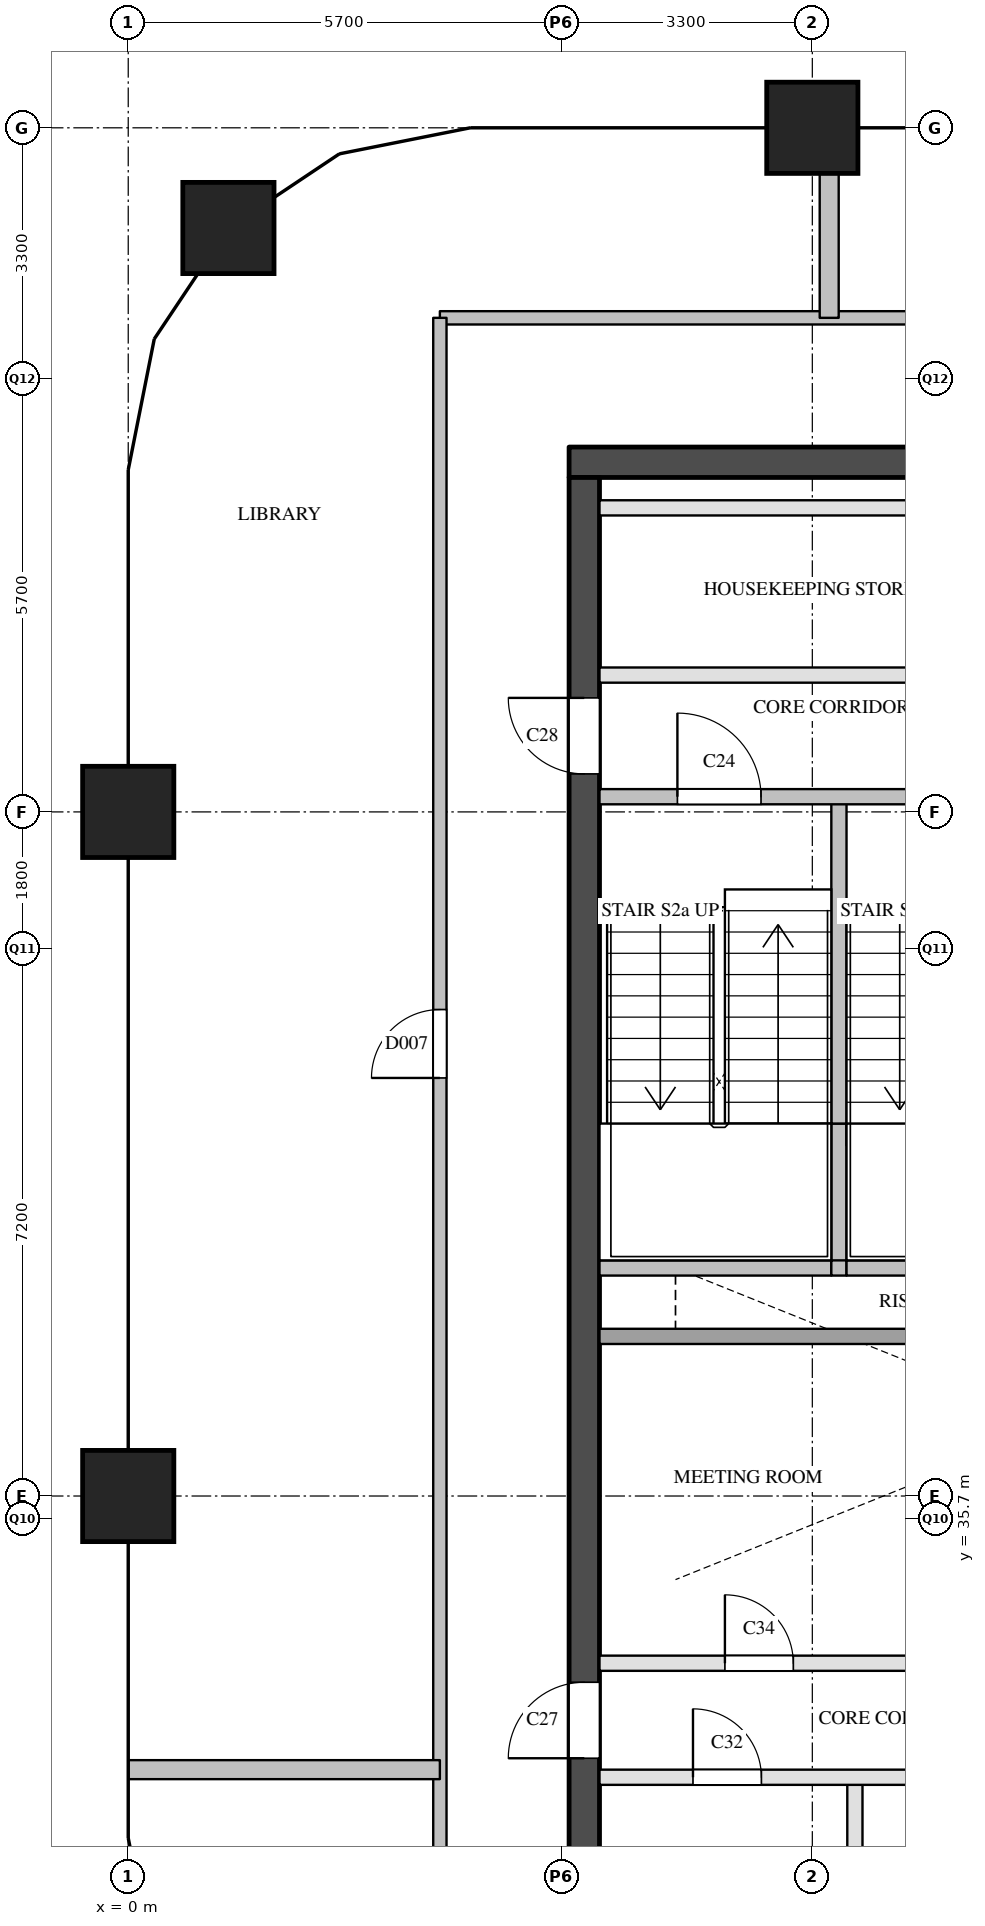
"""IFC4 building model, lengths in metres.
Left out: names, types, materials, properties, quantities, classifications, styles, units other than length and angle.
Written with IfcOpenShell. Run it as: python <this file> out.ifc"""

import sys

from ifc_helpers import new_model, si_unit, direction, frame, frame_2d, origin, origin_2d, place, context, subcontext, project, spatial, rectangle, extrude, element, fill, save


model = new_model("IFC4")
c1 = context("Model", 3, precision=1e-05, world=origin(), true_north=direction((0.0, 1.0)))
c2 = subcontext(c1, "Body", "Model", "MODEL_VIEW")
j1 = project(units=[si_unit("LENGTHUNIT", "METRE"), si_unit("PLANEANGLEUNIT", "RADIAN")], contexts=[c1])
p1 = place(None, origin())
s1 = spatial("IfcSite", under=j1, at=p1, CompositionType="ELEMENT")
p2 = place(p1, origin())
s2 = spatial("IfcBuilding", under=s1, at=p2, CompositionType="ELEMENT")
p3 = place(p2, frame((0.0, 0.0, 203.3)))
s3 = spatial("IfcBuildingStorey", under=s2, at=p3, CompositionType="ELEMENT", Elevation=203.3)
for number, where, z_axis, x_axis in (
    (1, (0.0, 36.0, 0.0), (0.0, 0.0, 1.0), (1.0, 0.0, 0.0)),
    (2, (0.0, 45.0, 0.0), (0.0, 0.0, 1.0), (1.0, 0.0, 0.0)),
    (3, (1.318, 52.682, 0.0), (0.0, 0.0, 1.0), (1.0, 0.0, 0.0)),
    (4, (9.0, 54.0, 0.0), (0.0, 0.0, 1.0), (1.0, 0.0, 0.0)),
):
    element("IfcColumn", number, at=place(p3, frame(where, z_axis=z_axis, x_axis=x_axis)), inside=s3, PredefinedType="COLUMN", context=c2, shape_type="SweptSolid", body=[
        extrude(rectangle(XDim=1.2, YDim=1.2, at=origin_2d()), origin(), (0.0, 0.0, 1.0), 3.9),
    ])
p4 = place(p3, frame((5.8, 49.6, 0.0), z_axis=(0.0, 0.0, 1.0), x_axis=(1.0, 0.0, 0.0)))
e5 = element("IfcWall", 5, at=p4, inside=s3, PredefinedType="SHEAR", context=c2, shape_type="SweptSolid", body=[
    extrude(rectangle(XDim=12.0, YDim=0.4, at=frame_2d((6.0, 0.0))), origin(), (0.0, 0.0, 1.0), 3.6),
])
p5 = place(p3, frame((6.0, 29.1, 0.0), z_axis=(0.0, 0.0, 1.0), x_axis=(0.0, 1.0, 0.0)))
e6 = element("IfcWall", 6, at=p5, inside=s3, PredefinedType="SHEAR", context=c2, shape_type="SweptSolid", body=[
    extrude(rectangle(XDim=20.3, YDim=0.4, at=frame_2d((10.15, 0.0))), origin(), (0.0, 0.0, 1.0), 3.6),
])
p6 = place(p5, frame((3.45, 0.0, 0.0)))
e7 = element("IfcOpeningElement", 7, at=p6, cuts=e6, PredefinedType="OPENING", context=c2, shape_type="SweptSolid", body=[
    extrude(rectangle(XDim=1.0, YDim=2.1, at=frame_2d((0.5, 1.05))), frame((0.0, 0.21, 0.0), z_axis=(0.0, -1.0, 0.0), x_axis=(1.0, 0.0, 0.0)), (0.0, 0.0, 1.0), 0.42),
])
p7 = place(p5, frame((16.4, 0.0, 0.0)))
e8 = element("IfcOpeningElement", 8, at=p7, cuts=e6, PredefinedType="OPENING", context=c2, shape_type="SweptSolid", body=[
    extrude(rectangle(XDim=1.0, YDim=2.1, at=frame_2d((0.5, 1.05))), frame((0.0, 0.21, 0.0), z_axis=(0.0, -1.0, 0.0), x_axis=(1.0, 0.0, 0.0)), (0.0, 0.0, 1.0), 0.42),
])
p8 = place(p3, frame((9.35, 39.0, 0.0), z_axis=(0.0, 0.0, 1.0), x_axis=(0.0, 1.0, 0.0)))
e9 = element("IfcWall", 9, at=p8, inside=s3, PredefinedType="SOLIDWALL", context=c2, shape_type="SweptSolid", body=[
    extrude(rectangle(XDim=1.9, YDim=0.2, at=frame_2d((0.95, 0.0))), origin(), (0.0, 0.0, 1.0), 3.6),
])
p9 = place(p3, frame((9.35, 40.9, 0.0), z_axis=(0.0, 0.0, 1.0), x_axis=(0.0, 1.0, 0.0)))
e10 = element("IfcWall", 10, at=p9, inside=s3, PredefinedType="SOLIDWALL", context=c2, shape_type="SweptSolid", body=[
    extrude(rectangle(XDim=4.3, YDim=0.2, at=frame_2d((2.15, 0.0))), origin(), (0.0, 0.0, 1.0), 3.6),
])
p10 = place(p3, frame((9.56, 29.1, 0.0), z_axis=(0.0, 0.0, 1.0), x_axis=(0.0, 1.0, 0.0)))
e11 = element("IfcWall", 11, at=p10, inside=s3, PredefinedType="PARTITIONING", context=c2, shape_type="SweptSolid", body=[
    extrude(rectangle(XDim=3.2, YDim=0.2, at=frame_2d((1.6, 0.0))), origin(), (0.0, 0.0, 1.0), 3.6),
])
p11 = place(p3, frame((6.2, 32.3, 0.0), z_axis=(0.0, 0.0, 1.0), x_axis=(1.0, 0.0, 0.0)))
e12 = element("IfcWall", 12, at=p11, inside=s3, PredefinedType="PARTITIONING", context=c2, shape_type="SweptSolid", body=[
    extrude(rectangle(XDim=8.4, YDim=0.2, at=frame_2d((4.2, 0.0))), origin(), (0.0, 0.0, 1.0), 3.6),
])
p12 = place(p11, frame((1.23, 0.0, 0.0)))
e13 = element("IfcOpeningElement", 13, at=p12, cuts=e12, PredefinedType="OPENING", context=c2, shape_type="SweptSolid", body=[
    extrude(rectangle(XDim=0.9, YDim=2.1, at=frame_2d((0.45, 1.05))), frame((0.0, 0.11, 0.0), z_axis=(0.0, -1.0, 0.0), x_axis=(1.0, 0.0, 0.0)), (0.0, 0.0, 1.0), 0.22),
])
p13 = place(p11, frame((5.43, 0.0, 0.0)))
e14 = element("IfcOpeningElement", 14, at=p13, cuts=e12, PredefinedType="OPENING", context=c2, shape_type="SweptSolid", body=[
    extrude(rectangle(XDim=0.9, YDim=2.1, at=frame_2d((0.45, 1.05))), frame((0.0, 0.11, 0.0), z_axis=(0.0, -1.0, 0.0), x_axis=(1.0, 0.0, 0.0)), (0.0, 0.0, 1.0), 0.22),
])
p14 = place(p3, frame((6.2, 33.8, 0.0), z_axis=(0.0, 0.0, 1.0), x_axis=(1.0, 0.0, 0.0)))
e15 = element("IfcWall", 15, at=p14, inside=s3, PredefinedType="PARTITIONING", context=c2, shape_type="SweptSolid", body=[
    extrude(rectangle(XDim=8.4, YDim=0.2, at=frame_2d((4.2, 0.0))), origin(), (0.0, 0.0, 1.0), 3.6),
])
p15 = place(p14, frame((1.65, 0.0, 0.0)))
e16 = element("IfcOpeningElement", 16, at=p15, cuts=e15, PredefinedType="OPENING", context=c2, shape_type="SweptSolid", body=[
    extrude(rectangle(XDim=0.9, YDim=2.1, at=frame_2d((0.45, 1.05))), frame((0.0, 0.11, 0.0), z_axis=(0.0, -1.0, 0.0), x_axis=(1.0, 0.0, 0.0)), (0.0, 0.0, 1.0), 0.22),
])
p16 = place(p14, frame((5.85, 0.0, 0.0)))
e17 = element("IfcOpeningElement", 17, at=p16, cuts=e15, PredefinedType="OPENING", context=c2, shape_type="SweptSolid", body=[
    extrude(rectangle(XDim=0.9, YDim=2.1, at=frame_2d((0.45, 1.05))), frame((0.0, 0.11, 0.0), z_axis=(0.0, -1.0, 0.0), x_axis=(1.0, 0.0, 0.0)), (0.0, 0.0, 1.0), 0.22),
])
p17 = place(p3, frame((6.2, 38.1, 0.0), z_axis=(0.0, 0.0, 1.0), x_axis=(1.0, 0.0, 0.0)))
e18 = element("IfcWall", 18, at=p17, inside=s3, PredefinedType="SOLIDWALL", context=c2, shape_type="SweptSolid", body=[
    extrude(rectangle(XDim=11.2, YDim=0.2, at=frame_2d((5.6, 0.0))), origin(), (0.0, 0.0, 1.0), 3.6),
])
p18 = place(p17, frame((8.85, 0.0, 0.0)))
e19 = element("IfcOpeningElement", 19, at=p18, cuts=e18, PredefinedType="OPENING", context=c2, shape_type="SweptSolid", body=[
    extrude(rectangle(XDim=1.2, YDim=2.1, at=frame_2d((0.6, 1.05))), frame((0.0, 0.11, 0.0), z_axis=(0.0, -1.0, 0.0), x_axis=(1.0, 0.0, 0.0)), (0.0, 0.0, 1.0), 0.22),
])
p19 = place(p3, frame((6.2, 39.0, 0.0), z_axis=(0.0, 0.0, 1.0), x_axis=(1.0, 0.0, 0.0)))
e20 = element("IfcWall", 20, at=p19, inside=s3, PredefinedType="SOLIDWALL", context=c2, shape_type="SweptSolid", body=[
    extrude(rectangle(XDim=3.05, YDim=0.2, at=frame_2d((1.525, 0.0))), origin(), (0.0, 0.0, 1.0), 3.6),
])
p20 = place(p3, frame((9.25, 39.0, 0.0), z_axis=(0.0, 0.0, 1.0), x_axis=(1.0, 0.0, 0.0)))
e21 = element("IfcWall", 21, at=p20, inside=s3, PredefinedType="SOLIDWALL", context=c2, shape_type="SweptSolid", body=[
    extrude(rectangle(XDim=0.2, YDim=0.2, at=frame_2d((0.1, 0.0))), origin(), (0.0, 0.0, 1.0), 3.6),
])
p21 = place(p3, frame((9.45, 39.0, 0.0), z_axis=(0.0, 0.0, 1.0), x_axis=(1.0, 0.0, 0.0)))
e22 = element("IfcWall", 22, at=p21, inside=s3, PredefinedType="SOLIDWALL", context=c2, shape_type="SweptSolid", body=[
    extrude(rectangle(XDim=3.05, YDim=0.2, at=frame_2d((1.525, 0.0))), origin(), (0.0, 0.0, 1.0), 3.6),
])
p22 = place(p3, frame((6.2, 45.2, 0.0), z_axis=(0.0, 0.0, 1.0), x_axis=(1.0, 0.0, 0.0)))
e23 = element("IfcWall", 23, at=p22, inside=s3, PredefinedType="SOLIDWALL", context=c2, shape_type="SweptSolid", body=[
    extrude(rectangle(XDim=6.3, YDim=0.2, at=frame_2d((3.15, 0.0))), origin(), (0.0, 0.0, 1.0), 3.6),
])
p23 = place(p22, frame((1.025, 0.0, 0.0)))
e24 = element("IfcOpeningElement", 24, at=p23, cuts=e23, PredefinedType="OPENING", context=c2, shape_type="SweptSolid", body=[
    extrude(rectangle(XDim=1.1, YDim=2.1, at=frame_2d((0.55, 1.05))), frame((0.0, 0.11, 0.0), z_axis=(0.0, -1.0, 0.0), x_axis=(1.0, 0.0, 0.0)), (0.0, 0.0, 1.0), 0.22),
])
p24 = place(p22, frame((4.175, 0.0, 0.0)))
e25 = element("IfcOpeningElement", 25, at=p24, cuts=e23, PredefinedType="OPENING", context=c2, shape_type="SweptSolid", body=[
    extrude(rectangle(XDim=1.1, YDim=2.1, at=frame_2d((0.55, 1.05))), frame((0.0, 0.11, 0.0), z_axis=(0.0, -1.0, 0.0), x_axis=(1.0, 0.0, 0.0)), (0.0, 0.0, 1.0), 0.22),
])
p25 = place(p3, frame((6.2, 46.8, 0.0), z_axis=(0.0, 0.0, 1.0), x_axis=(1.0, 0.0, 0.0)))
e26 = element("IfcWall", 26, at=p25, inside=s3, PredefinedType="PARTITIONING", context=c2, shape_type="SweptSolid", body=[
    extrude(rectangle(XDim=11.2, YDim=0.2, at=frame_2d((5.6, 0.0))), origin(), (0.0, 0.0, 1.0), 3.6),
])
p26 = place(p25, frame((5.15, 0.0, 0.0)))
e27 = element("IfcOpeningElement", 27, at=p26, cuts=e26, PredefinedType="OPENING", context=c2, shape_type="SweptSolid", body=[
    extrude(rectangle(XDim=0.9, YDim=2.1, at=frame_2d((0.45, 1.05))), frame((0.0, 0.11, 0.0), z_axis=(0.0, -1.0, 0.0), x_axis=(1.0, 0.0, 0.0)), (0.0, 0.0, 1.0), 0.22),
])
p27 = place(p3, frame((6.2, 49.0, 0.0), z_axis=(0.0, 0.0, 1.0), x_axis=(1.0, 0.0, 0.0)))
e28 = element("IfcWall", 28, at=p27, inside=s3, PredefinedType="PARTITIONING", context=c2, shape_type="SweptSolid", body=[
    extrude(rectangle(XDim=11.2, YDim=0.2, at=frame_2d((5.6, 0.0))), origin(), (0.0, 0.0, 1.0), 3.6),
])
p28 = place(p3, frame((4.1, 51.5, 0.0), z_axis=(0.0, 0.0, 1.0), x_axis=(1.0, 0.0, 0.0)))
e29 = element("IfcWall", 29, at=p28, inside=s3, PredefinedType="PARTITIONING", context=c2, shape_type="SweptSolid", body=[
    extrude(rectangle(XDim=15.4, YDim=0.175, at=frame_2d((7.7, 0.0))), origin(), (0.0, 0.0, 1.0), 3.6),
])
p29 = place(p28, frame((9.811, 0.0, 0.0)))
e30 = element("IfcOpeningElement", 30, at=p29, cuts=e29, PredefinedType="OPENING", context=c2, shape_type="SweptSolid", body=[
    extrude(rectangle(XDim=0.9, YDim=2.1, at=frame_2d((0.45, 1.05))), frame((0.0, 0.097, 0.0), z_axis=(0.0, -1.0, 0.0), x_axis=(1.0, 0.0, 0.0)), (0.0, 0.0, 1.0), 0.195),
])
p30 = place(p3, frame((4.1, 28.5, 0.0), z_axis=(0.0, 0.0, 1.0), x_axis=(0.0, 1.0, 0.0)))
e31 = element("IfcWall", 31, at=p30, inside=s3, PredefinedType="PARTITIONING", context=c2, shape_type="SweptSolid", body=[
    extrude(rectangle(XDim=23.0, YDim=0.175, at=frame_2d((11.5, 0.0))), origin(), (0.0, 0.0, 1.0), 3.6),
])
p31 = place(p30, frame((1.5, 0.0, 0.0)))
e32 = element("IfcOpeningElement", 32, at=p31, cuts=e31, PredefinedType="OPENING", context=c2, shape_type="SweptSolid", body=[
    extrude(rectangle(XDim=0.9, YDim=2.1, at=frame_2d((0.45, 1.05))), frame((0.0, 0.097, 0.0), z_axis=(0.0, -1.0, 0.0), x_axis=(1.0, 0.0, 0.0)), (0.0, 0.0, 1.0), 0.195),
])
p32 = place(p30, frame((13.0, 0.0, 0.0)))
e33 = element("IfcOpeningElement", 33, at=p32, cuts=e31, PredefinedType="OPENING", context=c2, shape_type="SweptSolid", body=[
    extrude(rectangle(XDim=0.9, YDim=2.1, at=frame_2d((0.45, 1.05))), frame((0.0, 0.097, 0.0), z_axis=(0.0, -1.0, 0.0), x_axis=(1.0, 0.0, 0.0)), (0.0, 0.0, 1.0), 0.195),
])
p33 = place(p3, frame((0.0, 32.4, 0.0), z_axis=(0.0, 0.0, 1.0), x_axis=(1.0, 0.0, 0.0)))
e34 = element("IfcWall", 34, at=p33, inside=s3, PredefinedType="PARTITIONING", context=c2, shape_type="SweptSolid", body=[
    extrude(rectangle(XDim=4.1, YDim=0.25, at=frame_2d((2.05, 0.0))), origin(), (0.0, 0.0, 1.0), 2.6),
])
p34 = place(p3, frame((9.222, 51.5, 0.0), z_axis=(0.0, 0.0, 1.0), x_axis=(0.0, 1.0, 0.0)))
e35 = element("IfcWall", 35, at=p34, inside=s3, PredefinedType="PARTITIONING", context=c2, shape_type="SweptSolid", body=[
    extrude(rectangle(XDim=2.5, YDim=0.25, at=frame_2d((1.25, 0.0))), origin(), (0.0, 0.0, 1.0), 3.6),
])
p35 = place(p23, origin())
e36 = element("IfcDoor", 36, at=p35, inside=s3, OperationType="SINGLE_SWING_LEFT", PredefinedType="DOOR", context=c2, shape_type="SweptSolid", body=[
    extrude(rectangle(XDim=1.1, YDim=2.1, at=frame_2d((0.55, 1.05))), frame((0.0, 0.025, 0.0), z_axis=(0.0, -1.0, 0.0), x_axis=(1.0, 0.0, 0.0)), (0.0, 0.0, 1.0), 0.05),
])
fill(e24, e36)
p36 = place(p6, origin())
e37 = element("IfcDoor", 37, at=p36, inside=s3, OperationType="SINGLE_SWING_LEFT", PredefinedType="DOOR", context=c2, shape_type="SweptSolid", body=[
    extrude(rectangle(XDim=1.0, YDim=2.1, at=frame_2d((0.5, 1.05))), frame((0.0, 0.025, 0.0), z_axis=(0.0, -1.0, 0.0), x_axis=(1.0, 0.0, 0.0)), (0.0, 0.0, 1.0), 0.05),
])
fill(e7, e37)
p37 = place(p7, origin())
e38 = element("IfcDoor", 38, at=p37, inside=s3, OperationType="SINGLE_SWING_RIGHT", PredefinedType="DOOR", context=c2, shape_type="SweptSolid", body=[
    extrude(rectangle(XDim=1.0, YDim=2.1, at=frame_2d((0.5, 1.05))), frame((0.0, 0.025, 0.0), z_axis=(0.0, -1.0, 0.0), x_axis=(1.0, 0.0, 0.0)), (0.0, 0.0, 1.0), 0.05),
])
fill(e8, e38)
p38 = place(p12, origin())
e39 = element("IfcDoor", 39, at=p38, inside=s3, OperationType="SINGLE_SWING_LEFT", PredefinedType="DOOR", context=c2, shape_type="SweptSolid", body=[
    extrude(rectangle(XDim=0.9, YDim=2.1, at=frame_2d((0.45, 1.05))), frame((0.0, 0.025, 0.0), z_axis=(0.0, -1.0, 0.0), x_axis=(1.0, 0.0, 0.0)), (0.0, 0.0, 1.0), 0.05),
])
fill(e13, e39)
p39 = place(p15, origin())
e40 = element("IfcDoor", 40, at=p39, inside=s3, OperationType="SINGLE_SWING_LEFT", PredefinedType="DOOR", context=c2, shape_type="SweptSolid", body=[
    extrude(rectangle(XDim=0.9, YDim=2.1, at=frame_2d((0.45, 1.05))), frame((0.0, 0.025, 0.0), z_axis=(0.0, -1.0, 0.0), x_axis=(1.0, 0.0, 0.0)), (0.0, 0.0, 1.0), 0.05),
])
fill(e16, e40)
p40 = place(p32, origin())
e41 = element("IfcDoor", 41, at=p40, inside=s3, OperationType="SINGLE_SWING_LEFT", PredefinedType="DOOR", context=c2, shape_type="SweptSolid", body=[
    extrude(rectangle(XDim=0.9, YDim=2.1, at=frame_2d((0.45, 1.05))), frame((0.0, 0.025, 0.0), z_axis=(0.0, -1.0, 0.0), x_axis=(1.0, 0.0, 0.0)), (0.0, 0.0, 1.0), 0.05),
])
fill(e33, e41)
save(model, sys.argv[1])
